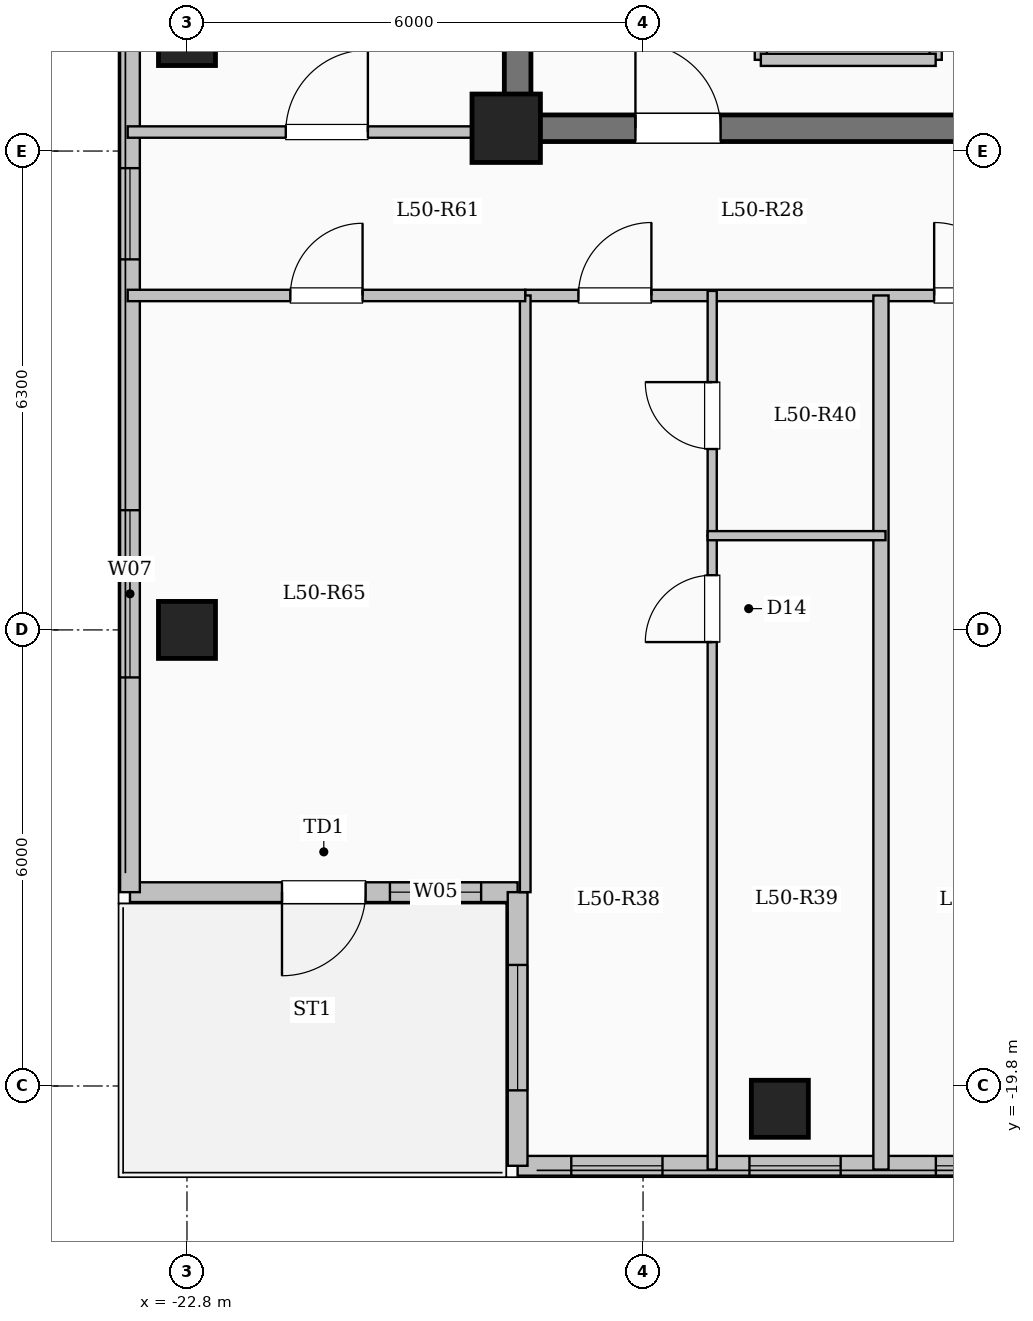
"""IFC4 building model, lengths in metres.
Left out: names, types, materials, properties, quantities, classifications, styles, units other than length and angle.
Written with IfcOpenShell. Run it as: python <this file> out.ifc"""

import sys

from ifc_helpers import new_model, si_unit, direction, frame, frame_2d, origin, origin_2d, place, context, subcontext, project, spatial, rectangle, extrude, element, fill, save


model = new_model("IFC4")
c1 = context("Model", 3, precision=1e-05, world=origin(), true_north=direction((0.0, 1.0)))
c2 = subcontext(c1, "Body", "Model", "MODEL_VIEW")
j1 = project(units=[si_unit("LENGTHUNIT", "METRE"), si_unit("PLANEANGLEUNIT", "RADIAN")], contexts=[c1])
p1 = place(None, origin())
s1 = spatial("IfcSite", under=j1, at=p1, CompositionType="ELEMENT")
p2 = place(p1, origin())
s2 = spatial("IfcBuilding", under=s1, at=p2, CompositionType="ELEMENT")
p3 = place(p2, frame((0.0, 0.0, 186.9)))
s3 = spatial("IfcBuildingStorey", under=s2, at=p3, CompositionType="ELEMENT", Elevation=186.9)
p4 = place(p3, frame((-18.6, -7.2, 0.0), z_axis=(0.0, 0.0, 1.0), x_axis=(1.0, 0.0, 0.0)))
e1 = element("IfcColumn", 1, at=p4, inside=s3, PredefinedType="COLUMN", context=c2, shape_type="SweptSolid", body=[
    extrude(rectangle(XDim=0.9, YDim=0.9, at=origin_2d()), origin(), (0.0, 0.0, 1.0), 3.35),
])
for number, where, z_axis, x_axis in (
    (2, (-15.0, -20.1, 0.0), (0.0, 0.0, 1.0), (1.0, 0.0, 0.0)),
    (3, (-22.8, -13.8, 0.0), (0.0, 0.0, 1.0), (1.0, 0.0, 0.0)),
    (4, (-22.8, -6.0, 0.0), (0.0, 0.0, 1.0), (1.0, 0.0, 0.0)),
):
    element("IfcColumn", number, at=place(p3, frame(where, z_axis=z_axis, x_axis=x_axis)), inside=s3, PredefinedType="COLUMN", context=c2, shape_type="SweptSolid", body=[
        extrude(rectangle(XDim=0.75, YDim=0.75, at=origin_2d()), origin(), (0.0, 0.0, 1.0), 3.35),
    ])
p5 = place(p3, frame((-18.45, -17.25, 0.0), z_axis=(0.0, 0.0, 1.0), x_axis=(-1.0, 0.0, 0.0)))
e5 = element("IfcWall", 5, at=p5, inside=s3, PredefinedType="SOLIDWALL", context=c2, shape_type="SweptSolid", body=[
    extrude(rectangle(XDim=5.1, YDim=0.26, at=frame_2d((2.55, 0.0))), origin(), (0.0, 0.0, 1.0), 3.1),
])
p6 = place(p5, frame((2.0, 0.0, 0.0)))
e6 = element("IfcOpeningElement", 6, at=p6, cuts=e5, PredefinedType="OPENING", context=c2, shape_type="SweptSolid", body=[
    extrude(rectangle(XDim=1.1, YDim=2.2, at=frame_2d((0.55, 1.1))), frame((0.0, 0.14, 0.0), z_axis=(0.0, -1.0, 0.0), x_axis=(1.0, 0.0, 0.0)), (0.0, 0.0, 1.0), 0.28),
])
p7 = place(p5, frame((0.48, 0.0, 0.95)))
e7 = element("IfcOpeningElement", 7, at=p7, cuts=e5, PredefinedType="OPENING", context=c2, shape_type="SweptSolid", body=[
    extrude(rectangle(XDim=1.2, YDim=1.5, at=frame_2d((0.6, 0.75))), frame((0.0, 0.14, 0.0), z_axis=(0.0, -1.0, 0.0), x_axis=(1.0, 0.0, 0.0)), (0.0, 0.0, 1.0), 0.28),
])
p8 = place(p3, frame((-23.55, -17.25, 0.0), z_axis=(0.0, 0.0, 1.0), x_axis=(0.0, 1.0, 0.0)))
e8 = element("IfcWall", 8, at=p8, inside=s3, PredefinedType="SOLIDWALL", context=c2, shape_type="SweptSolid", body=[
    extrude(rectangle(XDim=34.5, YDim=0.26, at=frame_2d((17.25, 0.0))), origin(), (0.0, 0.0, 1.0), 3.1),
])
p9 = place(p8, frame((2.825, 0.0, 0.9)))
e9 = element("IfcOpeningElement", 9, at=p9, cuts=e8, PredefinedType="OPENING", context=c2, shape_type="SweptSolid", body=[
    extrude(rectangle(XDim=2.2, YDim=1.75, at=frame_2d((1.1, 0.875))), frame((0.0, 0.14, 0.0), z_axis=(0.0, -1.0, 0.0), x_axis=(1.0, 0.0, 0.0)), (0.0, 0.0, 1.0), 0.28),
])
p10 = place(p8, frame((8.325, 0.0, 0.95)))
e10 = element("IfcOpeningElement", 10, at=p10, cuts=e8, PredefinedType="OPENING", context=c2, shape_type="SweptSolid", body=[
    extrude(rectangle(XDim=1.2, YDim=1.5, at=frame_2d((0.6, 0.75))), frame((0.0, 0.14, 0.0), z_axis=(0.0, -1.0, 0.0), x_axis=(1.0, 0.0, 0.0)), (0.0, 0.0, 1.0), 0.28),
])
p11 = place(p8, frame((18.0, 0.0, 0.9)))
e11 = element("IfcOpeningElement", 11, at=p11, cuts=e8, PredefinedType="OPENING", context=c2, shape_type="SweptSolid", body=[
    extrude(rectangle(XDim=2.0, YDim=1.7, at=frame_2d((1.0, 0.85))), frame((0.0, 0.14, 0.0), z_axis=(0.0, -1.0, 0.0), x_axis=(1.0, 0.0, 0.0)), (0.0, 0.0, 1.0), 0.28),
])
p12 = place(p8, frame((28.375, 0.0, 0.95)))
e12 = element("IfcOpeningElement", 12, at=p12, cuts=e8, PredefinedType="OPENING", context=c2, shape_type="SweptSolid", body=[
    extrude(rectangle(XDim=1.0, YDim=1.5, at=frame_2d((0.5, 0.75))), frame((0.0, 0.14, 0.0), z_axis=(0.0, -1.0, 0.0), x_axis=(1.0, 0.0, 0.0)), (0.0, 0.0, 1.0), 0.28),
])
p13 = place(p8, frame((31.125, 0.0, 0.9)))
e13 = element("IfcOpeningElement", 13, at=p13, cuts=e8, PredefinedType="OPENING", context=c2, shape_type="SweptSolid", body=[
    extrude(rectangle(XDim=2.0, YDim=1.7, at=frame_2d((1.0, 0.85))), frame((0.0, 0.14, 0.0), z_axis=(0.0, -1.0, 0.0), x_axis=(1.0, 0.0, 0.0)), (0.0, 0.0, 1.0), 0.28),
])
p14 = place(p3, frame((-7.35, -20.85, 0.0), z_axis=(0.0, 0.0, 1.0), x_axis=(-1.0, 0.0, 0.0)))
e14 = element("IfcWall", 14, at=p14, inside=s3, PredefinedType="SOLIDWALL", context=c2, shape_type="SweptSolid", body=[
    extrude(rectangle(XDim=11.1, YDim=0.26, at=frame_2d((5.55, 0.0))), origin(), (0.0, 0.0, 1.0), 3.1),
])
p15 = place(p14, frame((0.147, 0.0, 0.95)))
e15 = element("IfcOpeningElement", 15, at=p15, cuts=e14, PredefinedType="OPENING", context=c2, shape_type="SweptSolid", body=[
    extrude(rectangle(XDim=0.85, YDim=1.5, at=frame_2d((0.425, 0.75))), frame((0.0, 0.14, 0.0), z_axis=(0.0, -1.0, 0.0), x_axis=(1.0, 0.0, 0.0)), (0.0, 0.0, 1.0), 0.28),
])
p16 = place(p14, frame((1.861, 0.0, 0.95)))
e16 = element("IfcOpeningElement", 16, at=p16, cuts=e14, PredefinedType="OPENING", context=c2, shape_type="SweptSolid", body=[
    extrude(rectangle(XDim=1.2, YDim=1.5, at=frame_2d((0.6, 0.75))), frame((0.0, 0.14, 0.0), z_axis=(0.0, -1.0, 0.0), x_axis=(1.0, 0.0, 0.0)), (0.0, 0.0, 1.0), 0.28),
])
p17 = place(p14, frame((4.397, 0.0, 0.95)))
e17 = element("IfcOpeningElement", 17, at=p17, cuts=e14, PredefinedType="OPENING", context=c2, shape_type="SweptSolid", body=[
    extrude(rectangle(XDim=1.2, YDim=1.5, at=frame_2d((0.6, 0.75))), frame((0.0, 0.14, 0.0), z_axis=(0.0, -1.0, 0.0), x_axis=(1.0, 0.0, 0.0)), (0.0, 0.0, 1.0), 0.28),
])
p18 = place(p14, frame((6.85, 0.0, 0.95)))
e18 = element("IfcOpeningElement", 18, at=p18, cuts=e14, PredefinedType="OPENING", context=c2, shape_type="SweptSolid", body=[
    extrude(rectangle(XDim=1.2, YDim=1.5, at=frame_2d((0.6, 0.75))), frame((0.0, 0.14, 0.0), z_axis=(0.0, -1.0, 0.0), x_axis=(1.0, 0.0, 0.0)), (0.0, 0.0, 1.0), 0.28),
])
p19 = place(p14, frame((9.194, 0.0, 0.95)))
e19 = element("IfcOpeningElement", 19, at=p19, cuts=e14, PredefinedType="OPENING", context=c2, shape_type="SweptSolid", body=[
    extrude(rectangle(XDim=1.2, YDim=1.5, at=frame_2d((0.6, 0.75))), frame((0.0, 0.14, 0.0), z_axis=(0.0, -1.0, 0.0), x_axis=(1.0, 0.0, 0.0)), (0.0, 0.0, 1.0), 0.28),
])
p20 = place(p3, frame((-18.45, -20.85, 0.0), z_axis=(0.0, 0.0, 1.0), x_axis=(0.0, 1.0, 0.0)))
e20 = element("IfcWall", 20, at=p20, inside=s3, PredefinedType="SOLIDWALL", context=c2, shape_type="SweptSolid", body=[
    extrude(rectangle(XDim=3.6, YDim=0.26, at=frame_2d((1.8, 0.0))), origin(), (0.0, 0.0, 1.0), 3.1),
])
p21 = place(p20, frame((0.992, 0.0, 0.9)))
e21 = element("IfcOpeningElement", 21, at=p21, cuts=e20, PredefinedType="OPENING", context=c2, shape_type="SweptSolid", body=[
    extrude(rectangle(XDim=1.65, YDim=1.6, at=frame_2d((0.825, 0.8))), frame((0.0, 0.14, 0.0), z_axis=(0.0, -1.0, 0.0), x_axis=(1.0, 0.0, 0.0)), (0.0, 0.0, 1.0), 0.28),
])
p22 = place(p3, frame((-15.25, -6.3, 0.0), z_axis=(0.0, 0.0, 1.0), x_axis=(0.0, 1.0, 0.0)))
e22 = element("IfcWall", 22, at=p22, inside=s3, PredefinedType="SOLIDWALL", context=c2, shape_type="SweptSolid", body=[
    extrude(rectangle(XDim=2.6, YDim=0.16, at=frame_2d((1.3, 0.0))), origin(), (0.0, 0.0, 1.0), 3.1),
])
p23 = place(p22, frame((0.75, 0.0, 0.0)))
e23 = element("IfcOpeningElement", 23, at=p23, cuts=e22, PredefinedType="OPENING", context=c2, shape_type="SweptSolid", body=[
    extrude(rectangle(XDim=1.1, YDim=2.15, at=frame_2d((0.55, 1.075))), frame((0.0, 0.09, 0.0), z_axis=(0.0, -1.0, 0.0), x_axis=(1.0, 0.0, 0.0)), (0.0, 0.0, 1.0), 0.18),
])
p24 = place(p3, frame((-12.95, -6.3, 0.0), z_axis=(0.0, 0.0, 1.0), x_axis=(0.0, 1.0, 0.0)))
e24 = element("IfcWall", 24, at=p24, inside=s3, PredefinedType="SOLIDWALL", context=c2, shape_type="SweptSolid", body=[
    extrude(rectangle(XDim=2.6, YDim=0.16, at=frame_2d((1.3, 0.0))), origin(), (0.0, 0.0, 1.0), 3.1),
])
p25 = place(p3, frame((-15.25, -6.3, 0.0), z_axis=(0.0, 0.0, 1.0), x_axis=(1.0, 0.0, 0.0)))
e25 = element("IfcWall", 25, at=p25, inside=s3, PredefinedType="SOLIDWALL", context=c2, shape_type="SweptSolid", body=[
    extrude(rectangle(XDim=2.3, YDim=0.16, at=frame_2d((1.15, 0.0))), origin(), (0.0, 0.0, 1.0), 3.1),
])
p26 = place(p3, frame((-18.45, -7.375, 0.0), z_axis=(0.0, 0.0, 1.0), x_axis=(0.0, 1.0, 0.0)))
e26 = element("IfcWall", 26, at=p26, inside=s3, PredefinedType="SHEAR", context=c2, shape_type="SweptSolid", body=[
    extrude(rectangle(XDim=14.05, YDim=0.35, at=frame_2d((7.025, 0.0))), origin(), (0.0, 0.0, 1.0), 3.35),
])
p27 = place(p3, frame((-18.625, -7.2, 0.0), z_axis=(0.0, 0.0, 1.0), x_axis=(1.0, 0.0, 0.0)))
e27 = element("IfcWall", 27, at=p27, inside=s3, PredefinedType="SHEAR", context=c2, shape_type="SweptSolid", body=[
    extrude(rectangle(XDim=8.55, YDim=0.35, at=frame_2d((4.275, 0.0))), origin(), (0.0, 0.0, 1.0), 3.35),
])
p28 = place(p27, frame((1.725, 0.0, 0.0)))
e28 = element("IfcOpeningElement", 28, at=p28, cuts=e27, PredefinedType="OPENING", context=c2, shape_type="SweptSolid", body=[
    extrude(rectangle(XDim=1.12, YDim=2.15, at=frame_2d((0.56, 1.075))), frame((0.0, 0.185, 0.0), z_axis=(0.0, -1.0, 0.0), x_axis=(1.0, 0.0, 0.0)), (0.0, 0.0, 1.0), 0.37),
])
p29 = place(p3, frame((-18.35, -9.4, 0.0), z_axis=(0.0, 0.0, 1.0), x_axis=(1.0, 0.0, 0.0)))
e29 = element("IfcWall", 29, at=p29, inside=s3, PredefinedType="PARTITIONING", context=c2, shape_type="SweptSolid", body=[
    extrude(rectangle(XDim=9.8, YDim=0.15, at=frame_2d((4.9, 0.0))), origin(), (0.0, 0.0, 1.0), 3.1),
])
p30 = place(p29, frame((0.7, 0.0, 0.0)))
e30 = element("IfcOpeningElement", 30, at=p30, cuts=e29, PredefinedType="OPENING", context=c2, shape_type="SweptSolid", body=[
    extrude(rectangle(XDim=0.96, YDim=2.15, at=frame_2d((0.48, 1.075))), frame((0.0, 0.085, 0.0), z_axis=(0.0, -1.0, 0.0), x_axis=(1.0, 0.0, 0.0)), (0.0, 0.0, 1.0), 0.17),
])
p31 = place(p29, frame((5.38, 0.0, 0.0)))
e31 = element("IfcOpeningElement", 31, at=p31, cuts=e29, PredefinedType="OPENING", context=c2, shape_type="SweptSolid", body=[
    extrude(rectangle(XDim=0.96, YDim=2.15, at=frame_2d((0.48, 1.075))), frame((0.0, 0.085, 0.0), z_axis=(0.0, -1.0, 0.0), x_axis=(1.0, 0.0, 0.0)), (0.0, 0.0, 1.0), 0.17),
])
p32 = place(p3, frame((-13.67, -20.9, 0.0), z_axis=(0.0, 0.0, 1.0), x_axis=(0.0, 1.0, 0.0)))
e32 = element("IfcWall", 32, at=p32, inside=s3, PredefinedType="SOLIDWALL", context=c2, shape_type="SweptSolid", body=[
    extrude(rectangle(XDim=11.5, YDim=0.2, at=frame_2d((5.75, 0.0))), origin(), (0.0, 0.0, 1.0), 3.1),
])
p33 = place(p3, frame((-15.89, -20.9, 0.0), z_axis=(0.0, 0.0, 1.0), x_axis=(0.0, 1.0, 0.0)))
e33 = element("IfcWall", 33, at=p33, inside=s3, PredefinedType="PARTITIONING", context=c2, shape_type="SweptSolid", body=[
    extrude(rectangle(XDim=8.34, YDim=0.12, at=frame_2d((4.17, 0.0))), origin(), (0.0, 0.0, 1.0), 3.1),
])
p34 = place(p33, frame((6.94, 0.0, 0.0)))
e34 = element("IfcOpeningElement", 34, at=p34, cuts=e33, PredefinedType="OPENING", context=c2, shape_type="SweptSolid", body=[
    extrude(rectangle(XDim=0.88, YDim=2.1, at=frame_2d((0.44, 1.05))), frame((0.0, 0.07, 0.0), z_axis=(0.0, -1.0, 0.0), x_axis=(1.0, 0.0, 0.0)), (0.0, 0.0, 1.0), 0.14),
])
p35 = place(p3, frame((-15.89, -12.56, 0.0), z_axis=(0.0, 0.0, 1.0), x_axis=(0.0, 1.0, 0.0)))
e35 = element("IfcWall", 35, at=p35, inside=s3, PredefinedType="PARTITIONING", context=c2, shape_type="SweptSolid", body=[
    extrude(rectangle(XDim=3.22, YDim=0.12, at=frame_2d((1.61, 0.0))), origin(), (0.0, 0.0, 1.0), 3.1),
])
p36 = place(p35, frame((1.14, 0.0, 0.0)))
e36 = element("IfcOpeningElement", 36, at=p36, cuts=e35, PredefinedType="OPENING", context=c2, shape_type="SweptSolid", body=[
    extrude(rectangle(XDim=0.88, YDim=2.1, at=frame_2d((0.44, 1.05))), frame((0.0, 0.07, 0.0), z_axis=(0.0, -1.0, 0.0), x_axis=(1.0, 0.0, 0.0)), (0.0, 0.0, 1.0), 0.14),
])
p37 = place(p3, frame((-15.95, -12.56, 0.0), z_axis=(0.0, 0.0, 1.0), x_axis=(1.0, 0.0, 0.0)))
e37 = element("IfcWall", 37, at=p37, inside=s3, PredefinedType="PARTITIONING", context=c2, shape_type="SweptSolid", body=[
    extrude(rectangle(XDim=2.34, YDim=0.12, at=frame_2d((1.17, 0.0))), origin(), (0.0, 0.0, 1.0), 2.725),
])
p38 = place(p3, frame((-23.58, -7.25, 0.0), z_axis=(0.0, 0.0, 1.0), x_axis=(1.0, 0.0, 0.0)))
e38 = element("IfcWall", 38, at=p38, inside=s3, PredefinedType="PARTITIONING", context=c2, shape_type="SweptSolid", body=[
    extrude(rectangle(XDim=5.13, YDim=0.15, at=frame_2d((2.565, 0.0))), origin(), (0.0, 0.0, 1.0), 3.1),
])
p39 = place(p38, frame((2.08, 0.0, 0.0)))
e39 = element("IfcOpeningElement", 39, at=p39, cuts=e38, PredefinedType="OPENING", context=c2, shape_type="SweptSolid", body=[
    extrude(rectangle(XDim=1.08, YDim=2.15, at=frame_2d((0.54, 1.075))), frame((0.0, 0.085, 0.0), z_axis=(0.0, -1.0, 0.0), x_axis=(1.0, 0.0, 0.0)), (0.0, 0.0, 1.0), 0.17),
])
p40 = place(p3, frame((-18.35, -17.25, 0.0), z_axis=(0.0, 0.0, 1.0), x_axis=(0.0, 1.0, 0.0)))
e40 = element("IfcWall", 40, at=p40, inside=s3, PredefinedType="PARTITIONING", context=c2, shape_type="SweptSolid", body=[
    extrude(rectangle(XDim=7.85, YDim=0.14, at=frame_2d((3.925, 0.0))), origin(), (0.0, 0.0, 1.0), 3.1),
])
p41 = place(p3, frame((-23.58, -9.4, 0.0), z_axis=(0.0, 0.0, 1.0), x_axis=(1.0, 0.0, 0.0)))
e41 = element("IfcWall", 41, at=p41, inside=s3, PredefinedType="PARTITIONING", context=c2, shape_type="SweptSolid", body=[
    extrude(rectangle(XDim=5.23, YDim=0.15, at=frame_2d((2.615, 0.0))), origin(), (0.0, 0.0, 1.0), 3.1),
])
p42 = place(p41, frame((2.14, 0.0, 0.0)))
e42 = element("IfcOpeningElement", 42, at=p42, cuts=e41, PredefinedType="OPENING", context=c2, shape_type="SweptSolid", body=[
    extrude(rectangle(XDim=0.95, YDim=2.15, at=frame_2d((0.475, 1.075))), frame((0.0, 0.085, 0.0), z_axis=(0.0, -1.0, 0.0), x_axis=(1.0, 0.0, 0.0)), (0.0, 0.0, 1.0), 0.17),
])
p43 = place(p6, origin())
e43 = element("IfcDoor", 43, at=p43, inside=s3, OperationType="SINGLE_SWING_RIGHT", PredefinedType="DOOR", context=c2, shape_type="SweptSolid", body=[
    extrude(rectangle(XDim=1.1, YDim=2.2, at=frame_2d((0.55, 1.1))), frame((0.0, 0.025, 0.0), z_axis=(0.0, -1.0, 0.0), x_axis=(1.0, 0.0, 0.0)), (0.0, 0.0, 1.0), 0.05),
])
fill(e6, e43)
p44 = place(p7, origin())
e44 = element("IfcWindow", 44, at=p44, inside=s3, PartitioningType="SINGLE_PANEL", PredefinedType="WINDOW", context=c2, shape_type="SweptSolid", body=[
    extrude(rectangle(XDim=1.2, YDim=1.5, at=frame_2d((0.6, 0.75))), frame((0.0, 0.03, 0.0), z_axis=(0.0, -1.0, 0.0), x_axis=(1.0, 0.0, 0.0)), (0.0, 0.0, 1.0), 0.06),
])
fill(e7, e44)
p45 = place(p9, origin())
e45 = element("IfcWindow", 45, at=p45, inside=s3, PartitioningType="SINGLE_PANEL", PredefinedType="WINDOW", context=c2, shape_type="SweptSolid", body=[
    extrude(rectangle(XDim=2.2, YDim=1.75, at=frame_2d((1.1, 0.875))), frame((0.0, 0.03, 0.0), z_axis=(0.0, -1.0, 0.0), x_axis=(1.0, 0.0, 0.0)), (0.0, 0.0, 1.0), 0.06),
])
fill(e9, e45)
p46 = place(p10, origin())
e46 = element("IfcWindow", 46, at=p46, inside=s3, PartitioningType="SINGLE_PANEL", PredefinedType="WINDOW", context=c2, shape_type="SweptSolid", body=[
    extrude(rectangle(XDim=1.2, YDim=1.5, at=frame_2d((0.6, 0.75))), frame((0.0, 0.03, 0.0), z_axis=(0.0, -1.0, 0.0), x_axis=(1.0, 0.0, 0.0)), (0.0, 0.0, 1.0), 0.06),
])
fill(e10, e46)
p47 = place(p17, origin())
e47 = element("IfcWindow", 47, at=p47, inside=s3, PartitioningType="SINGLE_PANEL", PredefinedType="WINDOW", context=c2, shape_type="SweptSolid", body=[
    extrude(rectangle(XDim=1.2, YDim=1.5, at=frame_2d((0.6, 0.75))), frame((0.0, 0.03, 0.0), z_axis=(0.0, -1.0, 0.0), x_axis=(1.0, 0.0, 0.0)), (0.0, 0.0, 1.0), 0.06),
])
fill(e17, e47)
p48 = place(p18, origin())
e48 = element("IfcWindow", 48, at=p48, inside=s3, PartitioningType="SINGLE_PANEL", PredefinedType="WINDOW", context=c2, shape_type="SweptSolid", body=[
    extrude(rectangle(XDim=1.2, YDim=1.5, at=frame_2d((0.6, 0.75))), frame((0.0, 0.03, 0.0), z_axis=(0.0, -1.0, 0.0), x_axis=(1.0, 0.0, 0.0)), (0.0, 0.0, 1.0), 0.06),
])
fill(e18, e48)
p49 = place(p19, origin())
e49 = element("IfcWindow", 49, at=p49, inside=s3, PartitioningType="SINGLE_PANEL", PredefinedType="WINDOW", context=c2, shape_type="SweptSolid", body=[
    extrude(rectangle(XDim=1.2, YDim=1.5, at=frame_2d((0.6, 0.75))), frame((0.0, 0.03, 0.0), z_axis=(0.0, -1.0, 0.0), x_axis=(1.0, 0.0, 0.0)), (0.0, 0.0, 1.0), 0.06),
])
fill(e19, e49)
p50 = place(p21, origin())
e50 = element("IfcWindow", 50, at=p50, inside=s3, PartitioningType="SINGLE_PANEL", PredefinedType="WINDOW", context=c2, shape_type="SweptSolid", body=[
    extrude(rectangle(XDim=1.65, YDim=1.6, at=frame_2d((0.825, 0.8))), frame((0.0, 0.03, 0.0), z_axis=(0.0, -1.0, 0.0), x_axis=(1.0, 0.0, 0.0)), (0.0, 0.0, 1.0), 0.06),
])
fill(e21, e50)
p51 = place(p28, origin())
e51 = element("IfcDoor", 51, at=p51, inside=s3, OperationType="SINGLE_SWING_LEFT", PredefinedType="DOOR", context=c2, shape_type="SweptSolid", body=[
    extrude(rectangle(XDim=1.12, YDim=2.15, at=frame_2d((0.56, 1.075))), frame((0.0, 0.025, 0.0), z_axis=(0.0, -1.0, 0.0), x_axis=(1.0, 0.0, 0.0)), (0.0, 0.0, 1.0), 0.05),
])
fill(e28, e51)
p52 = place(p30, origin())
e52 = element("IfcDoor", 52, at=p52, inside=s3, OperationType="SINGLE_SWING_RIGHT", PredefinedType="DOOR", context=c2, shape_type="SweptSolid", body=[
    extrude(rectangle(XDim=0.96, YDim=2.15, at=frame_2d((0.48, 1.075))), frame((0.0, 0.025, 0.0), z_axis=(0.0, -1.0, 0.0), x_axis=(1.0, 0.0, 0.0)), (0.0, 0.0, 1.0), 0.05),
])
fill(e30, e52)
p53 = place(p34, origin())
e53 = element("IfcDoor", 53, at=p53, inside=s3, OperationType="SINGLE_SWING_LEFT", PredefinedType="DOOR", context=c2, shape_type="SweptSolid", body=[
    extrude(rectangle(XDim=0.88, YDim=2.1, at=frame_2d((0.44, 1.05))), frame((0.0, 0.025, 0.0), z_axis=(0.0, -1.0, 0.0), x_axis=(1.0, 0.0, 0.0)), (0.0, 0.0, 1.0), 0.05),
])
fill(e34, e53)
p54 = place(p36, origin())
e54 = element("IfcDoor", 54, at=p54, inside=s3, OperationType="SINGLE_SWING_RIGHT", PredefinedType="DOOR", context=c2, shape_type="SweptSolid", body=[
    extrude(rectangle(XDim=0.88, YDim=2.1, at=frame_2d((0.44, 1.05))), frame((0.0, 0.025, 0.0), z_axis=(0.0, -1.0, 0.0), x_axis=(1.0, 0.0, 0.0)), (0.0, 0.0, 1.0), 0.05),
])
fill(e36, e54)
p55 = place(p31, origin())
e55 = element("IfcDoor", 55, at=p55, inside=s3, OperationType="SINGLE_SWING_LEFT", PredefinedType="DOOR", context=c2, shape_type="SweptSolid", body=[
    extrude(rectangle(XDim=0.96, YDim=2.15, at=frame_2d((0.48, 1.075))), frame((0.0, 0.025, 0.0), z_axis=(0.0, -1.0, 0.0), x_axis=(1.0, 0.0, 0.0)), (0.0, 0.0, 1.0), 0.05),
])
fill(e31, e55)
p56 = place(p42, origin())
e56 = element("IfcDoor", 56, at=p56, inside=s3, OperationType="SINGLE_SWING_RIGHT", PredefinedType="DOOR", context=c2, shape_type="SweptSolid", body=[
    extrude(rectangle(XDim=0.95, YDim=2.15, at=frame_2d((0.475, 1.075))), frame((0.0, 0.025, 0.0), z_axis=(0.0, -1.0, 0.0), x_axis=(1.0, 0.0, 0.0)), (0.0, 0.0, 1.0), 0.05),
])
fill(e42, e56)
p57 = place(p39, origin())
e57 = element("IfcDoor", 57, at=p57, inside=s3, OperationType="SINGLE_SWING_RIGHT", PredefinedType="DOOR", context=c2, shape_type="SweptSolid", body=[
    extrude(rectangle(XDim=1.08, YDim=2.15, at=frame_2d((0.54, 1.075))), frame((0.0, 0.025, 0.0), z_axis=(0.0, -1.0, 0.0), x_axis=(1.0, 0.0, 0.0)), (0.0, 0.0, 1.0), 0.05),
])
fill(e39, e57)
save(model, sys.argv[1])
